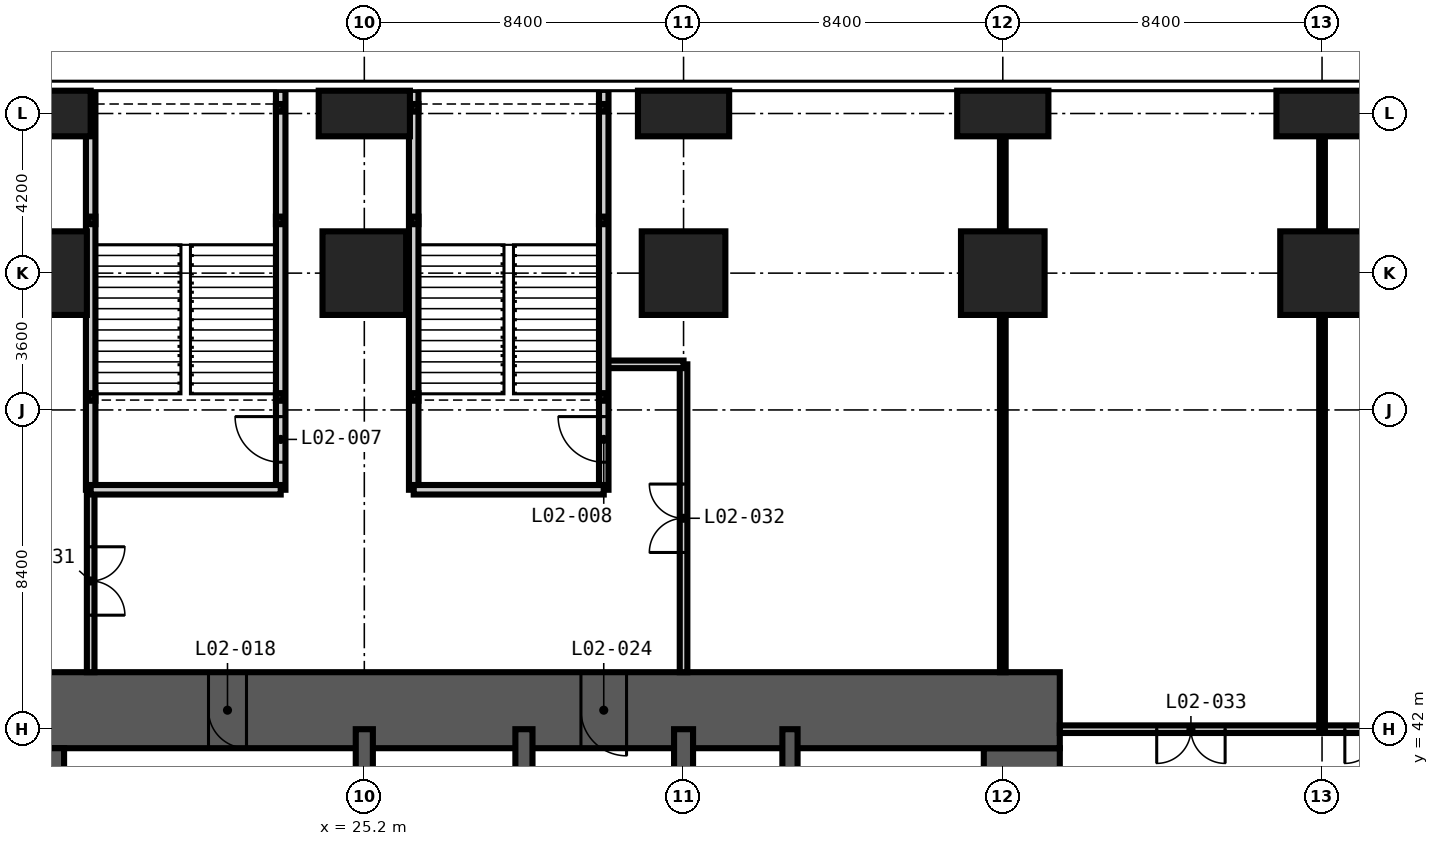
"""IFC4 building model, lengths in metres.
Left out: names, types, materials, properties, quantities, classifications, styles, units other than length and angle.
Written with IfcOpenShell. Run it as: python <this file> out.ifc"""

import sys

from ifc_helpers import new_model, si_unit, direction, frame, frame_2d, origin, origin_2d, place, context, subcontext, project, spatial, rectangle, hollow_rectangle, extrude, element, fill, save


model = new_model("IFC4")
c1 = context("Model", 3, precision=1e-05, world=origin(), true_north=direction((0.0, 1.0)))
c2 = subcontext(c1, "Body", "Model", "MODEL_VIEW")
j1 = project(units=[si_unit("LENGTHUNIT", "METRE"), si_unit("PLANEANGLEUNIT", "RADIAN")], contexts=[c1])
p1 = place(None, origin())
s1 = spatial("IfcSite", under=j1, at=p1, CompositionType="ELEMENT")
p2 = place(p1, origin())
s2 = spatial("IfcBuilding", under=s1, at=p2, CompositionType="ELEMENT")
p3 = place(p2, frame((0.0, 0.0, 12.0)))
s3 = spatial("IfcBuildingStorey", under=s2, at=p3, CompositionType="ELEMENT", Elevation=12.0)
p4 = place(p3, frame((16.8, 54.0, -0.3), z_axis=(0.0, 0.0, 1.0), x_axis=(1.0, 0.0, 0.0)))
e1 = element("IfcColumn", 1, at=p4, inside=s3, PredefinedType="COLUMN", context=c2, shape_type="SweptSolid", body=[
    extrude(rectangle(XDim=2.2, YDim=2.2, at=origin_2d()), origin(), (0.0, 0.0, 1.0), 5.0),
])
p5 = place(p3, frame((16.8, 58.2, -0.3), z_axis=(0.0, 0.0, 1.0), x_axis=(1.0, 0.0, 0.0)))
e2 = element("IfcColumn", 2, at=p5, inside=s3, PredefinedType="COLUMN", context=c2, shape_type="SweptSolid", body=[
    extrude(rectangle(XDim=2.4, YDim=1.2, at=origin_2d()), origin(), (0.0, 0.0, 1.0), 5.0),
])
p6 = place(p3, frame((25.2, 54.0, -0.3), z_axis=(0.0, 0.0, 1.0), x_axis=(1.0, 0.0, 0.0)))
e3 = element("IfcColumn", 3, at=p6, inside=s3, PredefinedType="COLUMN", context=c2, shape_type="SweptSolid", body=[
    extrude(rectangle(XDim=2.2, YDim=2.2, at=origin_2d()), origin(), (0.0, 0.0, 1.0), 5.0),
])
p7 = place(p3, frame((25.2, 58.2, -0.3), z_axis=(0.0, 0.0, 1.0), x_axis=(1.0, 0.0, 0.0)))
e4 = element("IfcColumn", 4, at=p7, inside=s3, PredefinedType="COLUMN", context=c2, shape_type="SweptSolid", body=[
    extrude(rectangle(XDim=2.4, YDim=1.2, at=origin_2d()), origin(), (0.0, 0.0, 1.0), 5.0),
])
p8 = place(p3, frame((33.6, 54.0, -0.3), z_axis=(0.0, 0.0, 1.0), x_axis=(1.0, 0.0, 0.0)))
e5 = element("IfcColumn", 5, at=p8, inside=s3, PredefinedType="COLUMN", context=c2, shape_type="SweptSolid", body=[
    extrude(rectangle(XDim=2.2, YDim=2.2, at=origin_2d()), origin(), (0.0, 0.0, 1.0), 5.0),
])
p9 = place(p3, frame((33.6, 58.2, -0.3), z_axis=(0.0, 0.0, 1.0), x_axis=(1.0, 0.0, 0.0)))
e6 = element("IfcColumn", 6, at=p9, inside=s3, PredefinedType="COLUMN", context=c2, shape_type="SweptSolid", body=[
    extrude(rectangle(XDim=2.4, YDim=1.2, at=origin_2d()), origin(), (0.0, 0.0, 1.0), 5.0),
])
p10 = place(p3, frame((42.0, 54.0, -0.3), z_axis=(0.0, 0.0, 1.0), x_axis=(1.0, 0.0, 0.0)))
e7 = element("IfcColumn", 7, at=p10, inside=s3, PredefinedType="COLUMN", context=c2, shape_type="SweptSolid", body=[
    extrude(rectangle(XDim=2.2, YDim=2.2, at=origin_2d()), origin(), (0.0, 0.0, 1.0), 5.0),
])
p11 = place(p3, frame((42.0, 58.2, -0.3), z_axis=(0.0, 0.0, 1.0), x_axis=(1.0, 0.0, 0.0)))
e8 = element("IfcColumn", 8, at=p11, inside=s3, PredefinedType="COLUMN", context=c2, shape_type="SweptSolid", body=[
    extrude(rectangle(XDim=2.4, YDim=1.2, at=origin_2d()), origin(), (0.0, 0.0, 1.0), 5.0),
])
p12 = place(p3, frame((50.4, 54.0, -0.3), z_axis=(0.0, 0.0, 1.0), x_axis=(1.0, 0.0, 0.0)))
e9 = element("IfcColumn", 9, at=p12, inside=s3, PredefinedType="COLUMN", context=c2, shape_type="SweptSolid", body=[
    extrude(rectangle(XDim=2.2, YDim=2.2, at=origin_2d()), origin(), (0.0, 0.0, 1.0), 5.0),
])
p13 = place(p3, frame((50.4, 58.2, -0.3), z_axis=(0.0, 0.0, 1.0), x_axis=(1.0, 0.0, 0.0)))
e10 = element("IfcColumn", 10, at=p13, inside=s3, PredefinedType="COLUMN", context=c2, shape_type="SweptSolid", body=[
    extrude(rectangle(XDim=2.4, YDim=1.2, at=origin_2d()), origin(), (0.0, 0.0, 1.0), 5.0),
])
p14 = place(p3, frame((42.5, 17.3, -0.3), z_axis=(0.0, 0.0, 1.0), x_axis=(0.0, 1.0, 0.0)))
e11 = element("IfcWall", 11, at=p14, inside=s3, PredefinedType="SHEAR", context=c2, shape_type="SweptSolid", body=[
    extrude(rectangle(XDim=24.2, YDim=2.0, at=frame_2d((12.1, 0.0))), origin(), (0.0, 0.0, 1.0), 5.0),
])
p15 = place(p14, frame((0.3, 0.0, 0.3)))
e12 = element("IfcOpeningElement", 12, at=p15, cuts=e11, PredefinedType="OPENING", context=c2, shape_type="SweptSolid", body=[
    extrude(rectangle(XDim=1.2, YDim=2.2, at=frame_2d((0.6, 1.1))), frame((0.0, 1.01, 0.0), z_axis=(0.0, -1.0, 0.0), x_axis=(1.0, 0.0, 0.0)), (0.0, 0.0, 1.0), 2.02),
])
p16 = place(p14, frame((11.6, 0.0, 0.3)))
e13 = element("IfcOpeningElement", 13, at=p16, cuts=e11, PredefinedType="OPENING", context=c2, shape_type="SweptSolid", body=[
    extrude(rectangle(XDim=1.0, YDim=2.1, at=frame_2d((0.5, 1.05))), frame((0.0, 1.01, 0.0), z_axis=(0.0, -1.0, 0.0), x_axis=(1.0, 0.0, 0.0)), (0.0, 0.0, 1.0), 2.02),
])
p17 = place(p14, frame((20.0, 0.0, 0.3)))
e14 = element("IfcOpeningElement", 14, at=p17, cuts=e11, PredefinedType="OPENING", context=c2, shape_type="SweptSolid", body=[
    extrude(rectangle(XDim=1.0, YDim=2.1, at=frame_2d((0.5, 1.05))), frame((0.0, 1.01, 0.0), z_axis=(0.0, -1.0, 0.0), x_axis=(1.0, 0.0, 0.0)), (0.0, 0.0, 1.0), 2.02),
])
p18 = place(p3, frame((43.5, 42.5, -0.3), z_axis=(0.0, 0.0, 1.0), x_axis=(-1.0, 0.0, 0.0)))
e15 = element("IfcWall", 15, at=p18, inside=s3, PredefinedType="SHEAR", context=c2, shape_type="SweptSolid", body=[
    extrude(rectangle(XDim=28.2, YDim=2.0, at=frame_2d((14.1, 0.0))), origin(), (0.0, 0.0, 1.0), 5.0),
])
p19 = place(p18, frame((21.4, 0.0, 0.3)))
e16 = element("IfcOpeningElement", 16, at=p19, cuts=e15, PredefinedType="OPENING", context=c2, shape_type="SweptSolid", body=[
    extrude(rectangle(XDim=1.0, YDim=2.1, at=frame_2d((0.5, 1.05))), frame((0.0, 1.01, 0.0), z_axis=(0.0, -1.0, 0.0), x_axis=(1.0, 0.0, 0.0)), (0.0, 0.0, 1.0), 2.02),
])
p20 = place(p18, frame((11.4, 0.0, 0.3)))
e17 = element("IfcOpeningElement", 17, at=p20, cuts=e15, PredefinedType="OPENING", context=c2, shape_type="SweptSolid", body=[
    extrude(rectangle(XDim=1.2, YDim=2.2, at=frame_2d((0.6, 1.1))), frame((0.0, 1.01, 0.0), z_axis=(0.0, -1.0, 0.0), x_axis=(1.0, 0.0, 0.0)), (0.0, 0.0, 1.0), 2.02),
])
p21 = place(p3, frame((16.3, 41.5, -0.3), z_axis=(0.0, 0.0, 1.0), x_axis=(0.0, -1.0, 0.0)))
e18 = element("IfcWall", 18, at=p21, inside=s3, PredefinedType="SHEAR", context=c2, shape_type="SweptSolid", body=[
    extrude(rectangle(XDim=24.2, YDim=2.0, at=frame_2d((12.1, 0.0))), origin(), (0.0, 0.0, 1.0), 5.0),
])
p22 = place(p21, frame((11.2, 0.0, 0.3)))
e19 = element("IfcOpeningElement", 19, at=p22, cuts=e18, PredefinedType="OPENING", context=c2, shape_type="SweptSolid", body=[
    extrude(rectangle(XDim=1.8, YDim=2.2, at=frame_2d((0.9, 1.1))), frame((0.0, 1.01, 0.0), z_axis=(0.0, -1.0, 0.0), x_axis=(1.0, 0.0, 0.0)), (0.0, 0.0, 1.0), 2.02),
])
p23 = place(p21, frame((20.0, 0.0, 0.3)))
e20 = element("IfcOpeningElement", 20, at=p23, cuts=e18, PredefinedType="OPENING", context=c2, shape_type="SweptSolid", body=[
    extrude(rectangle(XDim=1.0, YDim=2.1, at=frame_2d((0.5, 1.05))), frame((0.0, 1.01, 0.0), z_axis=(0.0, -1.0, 0.0), x_axis=(1.0, 0.0, 0.0)), (0.0, 0.0, 1.0), 2.02),
])
p24 = place(p21, frame((5.3, 0.0, 0.3)))
e21 = element("IfcOpeningElement", 21, at=p24, cuts=e18, PredefinedType="OPENING", context=c2, shape_type="SweptSolid", body=[
    extrude(rectangle(XDim=1.0, YDim=2.1, at=frame_2d((0.5, 1.05))), frame((0.0, 1.01, 0.0), z_axis=(0.0, -1.0, 0.0), x_axis=(1.0, 0.0, 0.0)), (0.0, 0.0, 1.0), 2.02),
])
p25 = place(p3, frame((36.4, 33.6, -0.3), z_axis=(0.0, 0.0, 1.0), x_axis=(0.0, 1.0, 0.0)))
e22 = element("IfcWall", 22, at=p25, inside=s3, PredefinedType="SHEAR", context=c2, shape_type="SweptSolid", body=[
    extrude(rectangle(XDim=8.4, YDim=0.4, at=frame_2d((4.2, 0.0))), origin(), (0.0, 0.0, 1.0), 5.0),
])
p26 = place(p3, frame((25.2, 16.8, -0.3), z_axis=(0.0, 0.0, 1.0), x_axis=(0.0, 1.0, 0.0)))
e23 = element("IfcWall", 23, at=p26, inside=s3, PredefinedType="SHEAR", context=c2, shape_type="SweptSolid", body=[
    extrude(rectangle(XDim=25.2, YDim=0.45, at=frame_2d((12.6, 0.0))), origin(), (0.0, 0.0, 1.0), 5.0),
])
p27 = place(p3, frame((29.4, 33.6, -0.3), z_axis=(0.0, 0.0, 1.0), x_axis=(0.0, 1.0, 0.0)))
e24 = element("IfcWall", 24, at=p27, inside=s3, PredefinedType="SHEAR", context=c2, shape_type="SweptSolid", body=[
    extrude(rectangle(XDim=8.4, YDim=0.45, at=frame_2d((4.2, 0.0))), origin(), (0.0, 0.0, 1.0), 5.0),
])
p28 = place(p27, frame((0.525, 0.0, 0.3)))
e25 = element("IfcOpeningElement", 25, at=p28, cuts=e24, PredefinedType="OPENING", context=c2, shape_type="SweptSolid", body=[
    extrude(rectangle(XDim=1.2, YDim=2.2, at=frame_2d((0.6, 1.1))), frame((0.0, 0.235, 0.0), z_axis=(0.0, -1.0, 0.0), x_axis=(1.0, 0.0, 0.0)), (0.0, 0.0, 1.0), 0.47),
])
p29 = place(p3, frame((33.6, 16.8, -0.3), z_axis=(0.0, 0.0, 1.0), x_axis=(0.0, 1.0, 0.0)))
e26 = element("IfcWall", 26, at=p29, inside=s3, PredefinedType="SHEAR", context=c2, shape_type="SweptSolid", body=[
    extrude(rectangle(XDim=25.2, YDim=0.5, at=frame_2d((12.6, 0.0))), origin(), (0.0, 0.0, 1.0), 5.0),
])
p30 = place(p29, frame((22.5, 0.0, 0.3)))
e27 = element("IfcOpeningElement", 27, at=p30, cuts=e26, PredefinedType="OPENING", context=c2, shape_type="SweptSolid", body=[
    extrude(rectangle(XDim=1.2, YDim=2.2, at=frame_2d((0.6, 1.1))), frame((0.0, 0.26, 0.0), z_axis=(0.0, -1.0, 0.0), x_axis=(1.0, 0.0, 0.0)), (0.0, 0.0, 1.0), 0.52),
])
p31 = place(p29, frame((18.3, 0.0, 0.3)))
e28 = element("IfcOpeningElement", 28, at=p31, cuts=e26, PredefinedType="OPENING", context=c2, shape_type="SweptSolid", body=[
    extrude(rectangle(XDim=1.2, YDim=2.2, at=frame_2d((0.6, 1.1))), frame((0.0, 0.26, 0.0), z_axis=(0.0, -1.0, 0.0), x_axis=(1.0, 0.0, 0.0)), (0.0, 0.0, 1.0), 0.52),
])
p32 = place(p29, frame((12.1, 0.0, 0.3)))
e29 = element("IfcOpeningElement", 29, at=p32, cuts=e26, PredefinedType="OPENING", context=c2, shape_type="SweptSolid", body=[
    extrude(rectangle(XDim=1.0, YDim=2.1, at=frame_2d((0.5, 1.05))), frame((0.0, 0.26, 0.0), z_axis=(0.0, -1.0, 0.0), x_axis=(1.0, 0.0, 0.0)), (0.0, 0.0, 1.0), 0.52),
])
p33 = place(p3, frame((33.6, 43.5, 0.0), z_axis=(0.0, 0.0, 1.0), x_axis=(0.0, 1.0, 0.0)))
e30 = element("IfcWall", 30, at=p33, inside=s3, PredefinedType="PARTITIONING", context=c2, shape_type="SweptSolid", body=[
    extrude(rectangle(XDim=8.1, YDim=0.2, at=frame_2d((4.05, 0.0))), origin(), (0.0, 0.0, 1.0), 4.7),
])
p34 = place(p33, frame((3.15, 0.0, 0.0)))
e31 = element("IfcOpeningElement", 31, at=p34, cuts=e30, PredefinedType="OPENING", context=c2, shape_type="SweptSolid", body=[
    extrude(rectangle(XDim=1.8, YDim=2.4, at=frame_2d((0.9, 1.2))), frame((0.0, 0.11, 0.0), z_axis=(0.0, -1.0, 0.0), x_axis=(1.0, 0.0, 0.0)), (0.0, 0.0, 1.0), 0.22),
])
p35 = place(p3, frame((18.0, 48.3, 0.0), z_axis=(0.0, 0.0, 1.0), x_axis=(0.0, -1.0, 0.0)))
e32 = element("IfcWall", 32, at=p35, inside=s3, PredefinedType="PARTITIONING", context=c2, shape_type="SweptSolid", body=[
    extrude(rectangle(XDim=4.8, YDim=0.2, at=frame_2d((2.4, 0.0))), origin(), (0.0, 0.0, 1.0), 4.7),
])
p36 = place(p35, frame((1.5, 0.0, 0.0)))
e33 = element("IfcOpeningElement", 33, at=p36, cuts=e32, PredefinedType="OPENING", context=c2, shape_type="SweptSolid", body=[
    extrude(rectangle(XDim=1.8, YDim=2.4, at=frame_2d((0.9, 1.2))), frame((0.0, 0.11, 0.0), z_axis=(0.0, -1.0, 0.0), x_axis=(1.0, 0.0, 0.0)), (0.0, 0.0, 1.0), 0.22),
])
p37 = place(p3, frame((58.8, 42.0, 0.0), z_axis=(0.0, 0.0, 1.0), x_axis=(-1.0, 0.0, 0.0)))
e34 = element("IfcWall", 34, at=p37, inside=s3, PredefinedType="PARTITIONING", context=c2, shape_type="SweptSolid", body=[
    extrude(rectangle(XDim=15.3, YDim=0.2, at=frame_2d((7.65, 0.0))), origin(), (0.0, 0.0, 1.0), 4.7),
])
p38 = place(p37, frame((10.95, 0.0, 0.0)))
e35 = element("IfcOpeningElement", 35, at=p38, cuts=e34, PredefinedType="OPENING", context=c2, shape_type="SweptSolid", body=[
    extrude(rectangle(XDim=1.8, YDim=2.4, at=frame_2d((0.9, 1.2))), frame((0.0, 0.11, 0.0), z_axis=(0.0, -1.0, 0.0), x_axis=(1.0, 0.0, 0.0)), (0.0, 0.0, 1.0), 0.22),
])
p39 = place(p37, frame((6.0, 0.0, 0.0)))
e36 = element("IfcOpeningElement", 36, at=p39, cuts=e34, PredefinedType="OPENING", context=c2, shape_type="SweptSolid", body=[
    extrude(rectangle(XDim=1.8, YDim=2.4, at=frame_2d((0.9, 1.2))), frame((0.0, 0.11, 0.0), z_axis=(0.0, -1.0, 0.0), x_axis=(1.0, 0.0, 0.0)), (0.0, 0.0, 1.0), 0.22),
])
p40 = place(p3, frame((33.6, 51.6, 0.0), z_axis=(0.0, 0.0, 1.0), x_axis=(-1.0, 0.0, 0.0)))
e37 = element("IfcWall", 37, at=p40, inside=s3, PredefinedType="PARTITIONING", context=c2, shape_type="SweptSolid", body=[
    extrude(rectangle(XDim=2.1, YDim=0.2, at=frame_2d((1.05, 0.0))), origin(), (0.0, 0.0, 1.0), 4.7),
])
p41 = place(p3, frame((42.0, 43.5, 0.0), z_axis=(0.0, 0.0, 1.0), x_axis=(0.0, 1.0, 0.0)))
e38 = element("IfcWall", 38, at=p41, inside=s3, PredefinedType="PARTITIONING", context=c2, shape_type="SweptSolid", body=[
    extrude(rectangle(XDim=15.3, YDim=0.15, at=frame_2d((7.65, 0.0))), origin(), (0.0, 0.0, 1.0), 4.7),
])
p42 = place(p3, frame((50.4, 42.0, 0.0), z_axis=(0.0, 0.0, 1.0), x_axis=(0.0, 1.0, 0.0)))
e39 = element("IfcWall", 39, at=p42, inside=s3, PredefinedType="PARTITIONING", context=c2, shape_type="SweptSolid", body=[
    extrude(rectangle(XDim=16.8, YDim=0.15, at=frame_2d((8.4, 0.0))), origin(), (0.0, 0.0, 1.0), 4.7),
])
p43 = place(p3, frame((18.0, 48.3, 0.0), z_axis=(0.0, 0.0, 1.0), x_axis=(0.0, 1.0, 0.0)))
e40 = element("IfcWall", 40, at=p43, inside=s3, PredefinedType="PARTITIONING", context=c2, shape_type="SweptSolid", body=[
    extrude(rectangle(XDim=10.523, YDim=0.25, at=frame_2d((5.261, 0.0))), origin(), (0.0, 0.0, 1.0), 4.7),
])
p44 = place(p3, frame((23.0, 48.3, 0.0), z_axis=(0.0, 0.0, 1.0), x_axis=(0.0, 1.0, 0.0)))
e41 = element("IfcWall", 41, at=p44, inside=s3, PredefinedType="PARTITIONING", context=c2, shape_type="SweptSolid", body=[
    extrude(rectangle(XDim=10.523, YDim=0.25, at=frame_2d((5.261, 0.0))), origin(), (0.0, 0.0, 1.0), 4.7),
])
p45 = place(p44, frame((0.725, 0.0, 0.0)))
e42 = element("IfcOpeningElement", 42, at=p45, cuts=e41, PredefinedType="OPENING", context=c2, shape_type="SweptSolid", body=[
    extrude(rectangle(XDim=1.2, YDim=2.2, at=frame_2d((0.6, 1.1))), frame((0.0, 0.135, 0.0), z_axis=(0.0, -1.0, 0.0), x_axis=(1.0, 0.0, 0.0)), (0.0, 0.0, 1.0), 0.27),
])
p46 = place(p3, frame((26.5, 48.3, 0.0), z_axis=(0.0, 0.0, 1.0), x_axis=(0.0, 1.0, 0.0)))
e43 = element("IfcWall", 43, at=p46, inside=s3, PredefinedType="PARTITIONING", context=c2, shape_type="SweptSolid", body=[
    extrude(rectangle(XDim=10.523, YDim=0.25, at=frame_2d((5.261, 0.0))), origin(), (0.0, 0.0, 1.0), 4.7),
])
p47 = place(p3, frame((31.5, 48.3, 0.0), z_axis=(0.0, 0.0, 1.0), x_axis=(0.0, 1.0, 0.0)))
e44 = element("IfcWall", 44, at=p47, inside=s3, PredefinedType="PARTITIONING", context=c2, shape_type="SweptSolid", body=[
    extrude(rectangle(XDim=10.523, YDim=0.25, at=frame_2d((5.261, 0.0))), origin(), (0.0, 0.0, 1.0), 4.7),
])
p48 = place(p47, frame((0.725, 0.0, 0.0)))
e45 = element("IfcOpeningElement", 45, at=p48, cuts=e44, PredefinedType="OPENING", context=c2, shape_type="SweptSolid", body=[
    extrude(rectangle(XDim=1.2, YDim=2.2, at=frame_2d((0.6, 1.1))), frame((0.0, 0.135, 0.0), z_axis=(0.0, -1.0, 0.0), x_axis=(1.0, 0.0, 0.0)), (0.0, 0.0, 1.0), 0.27),
])
for number, where, z_axis, x_axis in (
    (46, (18.0, 48.3, 0.0), (0.0, 0.0, 1.0), (1.0, 0.0, 0.0)),
    (47, (26.5, 48.3, 0.0), (0.0, 0.0, 1.0), (1.0, 0.0, 0.0)),
):
    element("IfcWall", number, at=place(p3, frame(where, z_axis=z_axis, x_axis=x_axis)), inside=s3, PredefinedType="PARTITIONING", context=c2, shape_type="SweptSolid", body=[
        extrude(rectangle(XDim=5.0, YDim=0.25, at=frame_2d((2.5, 0.0))), origin(), (0.0, 0.0, 1.0), 4.7),
    ])
for number, where, z_axis, x_axis in (
    (48, (18.025, 50.742, -0.3), (0.0, 0.0, 1.0), (1.0, 0.0, 0.0)),
    (49, (22.975, 50.742, -0.3), (0.0, 0.0, 1.0), (1.0, 0.0, 0.0)),
    (50, (18.025, 55.387, -0.3), (0.0, 0.0, 1.0), (1.0, 0.0, 0.0)),
    (51, (22.975, 55.387, -0.3), (0.0, 0.0, 1.0), (1.0, 0.0, 0.0)),
    (52, (22.975, 58.35, -0.3), (0.0, 0.0, 1.0), (1.0, 0.0, 0.0)),
    (53, (26.525, 50.742, -0.3), (0.0, 0.0, 1.0), (1.0, 0.0, 0.0)),
    (54, (31.475, 50.742, -0.3), (0.0, 0.0, 1.0), (1.0, 0.0, 0.0)),
    (55, (26.525, 55.387, -0.3), (0.0, 0.0, 1.0), (1.0, 0.0, 0.0)),
    (56, (31.475, 55.387, -0.3), (0.0, 0.0, 1.0), (1.0, 0.0, 0.0)),
    (57, (26.525, 58.35, -0.3), (0.0, 0.0, 1.0), (1.0, 0.0, 0.0)),
    (58, (31.475, 58.35, -0.3), (0.0, 0.0, 1.0), (1.0, 0.0, 0.0)),
):
    element("IfcColumn", number, at=place(p3, frame(where, z_axis=z_axis, x_axis=x_axis)), inside=s3, PredefinedType="COLUMN", context=c2, shape_type="SweptSolid", body=[
        extrude(hollow_rectangle(XDim=0.2, YDim=0.2, WallThickness=0.01, at=origin_2d()), origin(), (0.0, 0.0, 1.0), 5.0),
    ])
p49 = place(p45, origin())
e59 = element("IfcDoor", 59, at=p49, inside=s3, OperationType="SINGLE_SWING_RIGHT", PredefinedType="DOOR", context=c2, shape_type="SweptSolid", body=[
    extrude(rectangle(XDim=1.2, YDim=2.2, at=frame_2d((0.6, 1.1))), frame((0.0, 0.025, 0.0), z_axis=(0.0, -1.0, 0.0), x_axis=(1.0, 0.0, 0.0)), (0.0, 0.0, 1.0), 0.05),
])
fill(e42, e59)
p50 = place(p48, origin())
e60 = element("IfcDoor", 60, at=p50, inside=s3, OperationType="SINGLE_SWING_RIGHT", PredefinedType="DOOR", context=c2, shape_type="SweptSolid", body=[
    extrude(rectangle(XDim=1.2, YDim=2.2, at=frame_2d((0.6, 1.1))), frame((0.0, 0.025, 0.0), z_axis=(0.0, -1.0, 0.0), x_axis=(1.0, 0.0, 0.0)), (0.0, 0.0, 1.0), 0.05),
])
fill(e45, e60)
p51 = place(p19, origin())
e61 = element("IfcDoor", 61, at=p51, inside=s3, OperationType="SINGLE_SWING_LEFT", PredefinedType="DOOR", context=c2, shape_type="SweptSolid", body=[
    extrude(rectangle(XDim=1.0, YDim=2.1, at=frame_2d((0.5, 1.05))), frame((0.0, 0.025, 0.0), z_axis=(0.0, -1.0, 0.0), x_axis=(1.0, 0.0, 0.0)), (0.0, 0.0, 1.0), 0.05),
])
fill(e16, e61)
p52 = place(p20, origin())
e62 = element("IfcDoor", 62, at=p52, inside=s3, OperationType="SINGLE_SWING_LEFT", PredefinedType="DOOR", context=c2, shape_type="SweptSolid", body=[
    extrude(rectangle(XDim=1.2, YDim=2.2, at=frame_2d((0.6, 1.1))), frame((0.0, 0.025, 0.0), z_axis=(0.0, -1.0, 0.0), x_axis=(1.0, 0.0, 0.0)), (0.0, 0.0, 1.0), 0.05),
])
fill(e17, e62)
p53 = place(p36, origin())
e63 = element("IfcDoor", 63, at=p53, inside=s3, OperationType="DOUBLE_DOOR_DOUBLE_SWING", PredefinedType="DOOR", context=c2, shape_type="SweptSolid", body=[
    extrude(rectangle(XDim=1.8, YDim=2.4, at=frame_2d((0.9, 1.2))), frame((0.0, 0.025, 0.0), z_axis=(0.0, -1.0, 0.0), x_axis=(1.0, 0.0, 0.0)), (0.0, 0.0, 1.0), 0.05),
])
fill(e33, e63)
p54 = place(p34, origin())
e64 = element("IfcDoor", 64, at=p54, inside=s3, OperationType="DOUBLE_DOOR_DOUBLE_SWING", PredefinedType="DOOR", context=c2, shape_type="SweptSolid", body=[
    extrude(rectangle(XDim=1.8, YDim=2.4, at=frame_2d((0.9, 1.2))), frame((0.0, 0.025, 0.0), z_axis=(0.0, -1.0, 0.0), x_axis=(1.0, 0.0, 0.0)), (0.0, 0.0, 1.0), 0.05),
])
fill(e31, e64)
p55 = place(p38, origin())
e65 = element("IfcDoor", 65, at=p55, inside=s3, OperationType="DOUBLE_DOOR_DOUBLE_SWING", PredefinedType="DOOR", context=c2, shape_type="SweptSolid", body=[
    extrude(rectangle(XDim=1.8, YDim=2.4, at=frame_2d((0.9, 1.2))), frame((0.0, 0.025, 0.0), z_axis=(0.0, -1.0, 0.0), x_axis=(1.0, 0.0, 0.0)), (0.0, 0.0, 1.0), 0.05),
])
fill(e35, e65)
p56 = place(p39, origin())
e66 = element("IfcDoor", 66, at=p56, inside=s3, OperationType="DOUBLE_DOOR_DOUBLE_SWING", PredefinedType="DOOR", context=c2, shape_type="SweptSolid", body=[
    extrude(rectangle(XDim=1.8, YDim=2.4, at=frame_2d((0.9, 1.2))), frame((0.0, 0.025, 0.0), z_axis=(0.0, -1.0, 0.0), x_axis=(1.0, 0.0, 0.0)), (0.0, 0.0, 1.0), 0.05),
])
fill(e36, e66)
save(model, sys.argv[1])
